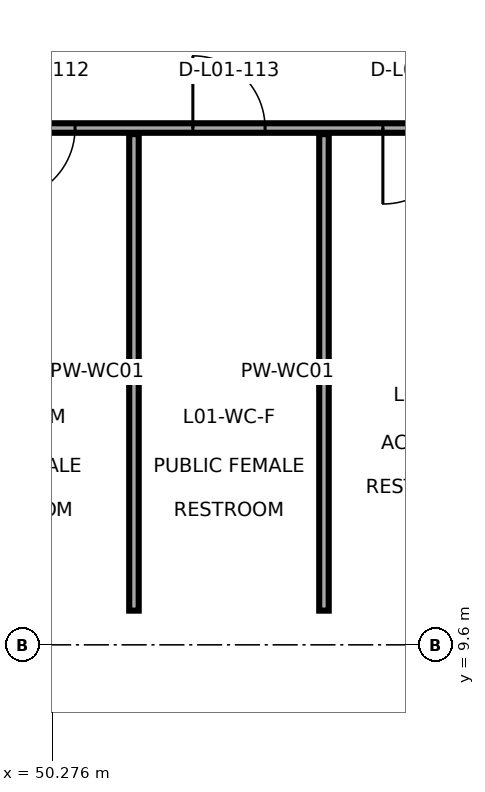
"""IFC4 building model, lengths in metres.
Left out: names, types, materials, properties, quantities, classifications, styles, units other than length and angle.
Written with IfcOpenShell. Run it as: python <this file> out.ifc"""

import sys

from ifc_helpers import new_model, si_unit, direction, frame, frame_2d, origin, place, context, subcontext, project, spatial, rectangle, extrude, element, fill, save


model = new_model("IFC4")
c1 = context("Model", 3, precision=1e-05, world=origin(), true_north=direction((0.0, 1.0)))
c2 = subcontext(c1, "Body", "Model", "MODEL_VIEW")
j1 = project(units=[si_unit("LENGTHUNIT", "METRE"), si_unit("PLANEANGLEUNIT", "RADIAN")], contexts=[c1])
p1 = place(None, origin())
s1 = spatial("IfcSite", under=j1, at=p1, CompositionType="ELEMENT")
p2 = place(p1, origin())
s2 = spatial("IfcBuilding", under=s1, at=p2, CompositionType="ELEMENT")
p3 = place(p2, frame((0.0, 0.0, 8.4)))
s3 = spatial("IfcBuildingStorey", under=s2, at=p3, CompositionType="ELEMENT", Elevation=8.4)
p4 = place(p3, frame((48.85, 16.4, 0.0), z_axis=(0.0, 0.0, 1.0), x_axis=(1.0, 0.0, 0.0)))
e1 = element("IfcWall", 1, at=p4, inside=s3, PredefinedType="PARTITIONING", context=c2, shape_type="SweptSolid", body=[
    extrude(rectangle(XDim=7.5, YDim=0.125, at=frame_2d((3.75, 0.0))), origin(), (0.0, 0.0, 1.0), 3.902),
])
p5 = place(p4, frame((0.775, 0.0, 0.0)))
e2 = element("IfcOpeningElement", 2, at=p5, cuts=e1, PredefinedType="OPENING", context=c2, shape_type="SweptSolid", body=[
    extrude(rectangle(XDim=0.95, YDim=2.1, at=frame_2d((0.475, 1.05))), frame((0.0, 0.073, 0.0), z_axis=(0.0, -1.0, 0.0), x_axis=(1.0, 0.0, 0.0)), (0.0, 0.0, 1.0), 0.145),
])
p6 = place(p4, frame((3.275, 0.0, 0.0)))
e3 = element("IfcOpeningElement", 3, at=p6, cuts=e1, PredefinedType="OPENING", context=c2, shape_type="SweptSolid", body=[
    extrude(rectangle(XDim=0.95, YDim=2.1, at=frame_2d((0.475, 1.05))), frame((0.0, 0.073, 0.0), z_axis=(0.0, -1.0, 0.0), x_axis=(1.0, 0.0, 0.0)), (0.0, 0.0, 1.0), 0.145),
])
p7 = place(p4, frame((5.775, 0.0, 0.0)))
e4 = element("IfcOpeningElement", 4, at=p7, cuts=e1, PredefinedType="OPENING", context=c2, shape_type="SweptSolid", body=[
    extrude(rectangle(XDim=1.0, YDim=2.12, at=frame_2d((0.5, 1.06))), frame((0.0, 0.073, 0.0), z_axis=(0.0, -1.0, 0.0), x_axis=(1.0, 0.0, 0.0)), (0.0, 0.0, 1.0), 0.145),
])
for number, where, z_axis, x_axis in (
    (5, (51.35, 10.05, 0.0), (0.0, 0.0, 1.0), (0.0, 1.0, 0.0)),
    (6, (53.85, 10.05, 0.0), (0.0, 0.0, 1.0), (0.0, 1.0, 0.0)),
):
    element("IfcWall", number, at=place(p3, frame(where, z_axis=z_axis, x_axis=x_axis)), inside=s3, PredefinedType="PARTITIONING", context=c2, shape_type="SweptSolid", body=[
        extrude(rectangle(XDim=6.27, YDim=0.125, at=frame_2d((3.135, 0.0))), origin(), (0.0, 0.0, 1.0), 4.23),
    ])
p8 = place(p5, frame((0.95, 0.0, 0.0), z_axis=(0.0, 0.0, 1.0), x_axis=(-1.0, 0.0, 0.0)))
e7 = element("IfcDoor", 7, at=p8, inside=s3, OperationType="SINGLE_SWING_RIGHT", PredefinedType="DOOR", context=c2, shape_type="SweptSolid", body=[
    extrude(rectangle(XDim=0.95, YDim=2.1, at=frame_2d((0.475, 1.05))), frame((0.0, 0.025, 0.0), z_axis=(0.0, -1.0, 0.0), x_axis=(1.0, 0.0, 0.0)), (0.0, 0.0, 1.0), 0.05),
])
fill(e2, e7)
p9 = place(p6, frame((0.95, 0.0, 0.0), z_axis=(0.0, 0.0, 1.0), x_axis=(-1.0, 0.0, 0.0)))
e8 = element("IfcDoor", 8, at=p9, inside=s3, OperationType="SINGLE_SWING_LEFT", PredefinedType="DOOR", context=c2, shape_type="SweptSolid", body=[
    extrude(rectangle(XDim=0.95, YDim=2.1, at=frame_2d((0.475, 1.05))), frame((0.0, 0.025, 0.0), z_axis=(0.0, -1.0, 0.0), x_axis=(1.0, 0.0, 0.0)), (0.0, 0.0, 1.0), 0.05),
])
fill(e3, e8)
p10 = place(p7, frame((1.0, 0.0, 0.0), z_axis=(0.0, 0.0, 1.0), x_axis=(-1.0, 0.0, 0.0)))
e9 = element("IfcDoor", 9, at=p10, inside=s3, OperationType="SINGLE_SWING_RIGHT", PredefinedType="DOOR", context=c2, shape_type="SweptSolid", body=[
    extrude(rectangle(XDim=1.0, YDim=2.12, at=frame_2d((0.5, 1.06))), frame((0.0, 0.025, 0.0), z_axis=(0.0, -1.0, 0.0), x_axis=(1.0, 0.0, 0.0)), (0.0, 0.0, 1.0), 0.05),
])
fill(e4, e9)
save(model, sys.argv[1])
